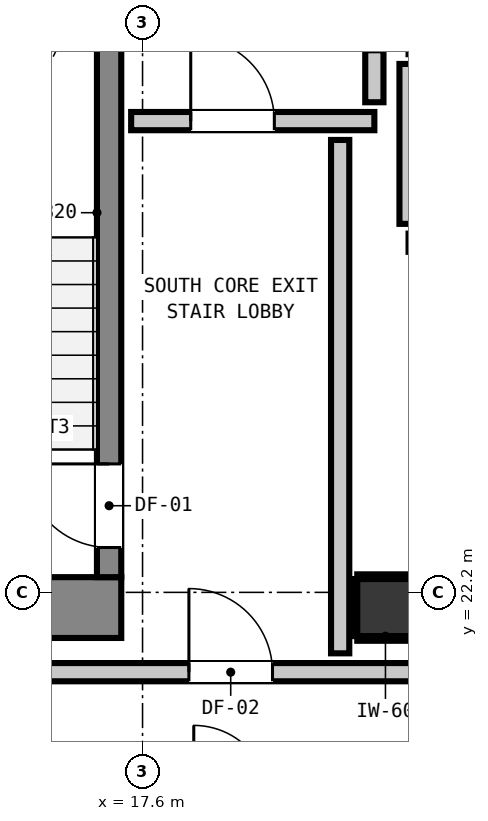
"""IFC4 building model, lengths in metres.
Left out: names, types, materials, properties, quantities, classifications, styles, units other than length and angle.
Written with IfcOpenShell. Run it as: python <this file> out.ifc"""

import sys

from ifc_helpers import new_model, si_unit, direction, frame, frame_2d, origin, origin_2d, place, context, subcontext, project, spatial, rectangle, extrude, element, fill, save


model = new_model("IFC4")
c1 = context("Model", 3, precision=1e-05, world=origin(), true_north=direction((0.0, 1.0)))
c2 = subcontext(c1, "Body", "Model", "MODEL_VIEW")
j1 = project(units=[si_unit("LENGTHUNIT", "METRE"), si_unit("PLANEANGLEUNIT", "RADIAN")], contexts=[c1])
p1 = place(None, origin())
s1 = spatial("IfcSite", under=j1, at=p1, CompositionType="ELEMENT")
p2 = place(p1, origin())
s2 = spatial("IfcBuilding", under=s1, at=p2, CompositionType="ELEMENT")
p3 = place(p2, frame((0.0, 0.0, 223.36)))
s3 = spatial("IfcBuildingStorey", under=s2, at=p3, CompositionType="ELEMENT", Elevation=223.36)
p4 = place(p3, frame((20.8, 22.0, 0.0), z_axis=(0.0, 0.0, 1.0), x_axis=(1.0, 0.0, 0.0)))
e1 = element("IfcColumn", 1, at=p4, inside=s3, PredefinedType="COLUMN", context=c2, shape_type="SweptSolid", body=[
    extrude(rectangle(XDim=0.75, YDim=0.75, at=origin_2d()), origin(), (0.0, 0.0, 1.0), 3.32),
])
p5 = place(p3, frame((13.24, 22.0, 0.0), z_axis=(0.0, 0.0, 1.0), x_axis=(1.0, 0.0, 0.0)))
e2 = element("IfcWall", 2, at=p5, inside=s3, PredefinedType="SHEAR", context=c2, shape_type="SweptSolid", body=[
    extrude(rectangle(XDim=4.08, YDim=0.8, at=frame_2d((2.04, 0.0))), origin(), (0.0, 0.0, 1.0), 3.32),
])
p6 = place(p3, frame((17.16, 22.4, 0.0), z_axis=(0.0, 0.0, 1.0), x_axis=(0.0, 1.0, 0.0)))
e3 = element("IfcWall", 3, at=p6, inside=s3, PredefinedType="SHEAR", context=c2, shape_type="SweptSolid", body=[
    extrude(rectangle(XDim=8.0, YDim=0.32, at=frame_2d((4.0, 0.0))), origin(), (0.0, 0.0, 1.0), 3.32),
])
p7 = place(p6, frame((0.39, 0.0, 0.0)))
e4 = element("IfcOpeningElement", 4, at=p7, cuts=e3, PredefinedType="OPENING", context=c2, shape_type="SweptSolid", body=[
    extrude(rectangle(XDim=1.1, YDim=2.15, at=frame_2d((0.55, 1.075))), frame((0.0, 0.17, 0.0), z_axis=(0.0, -1.0, 0.0), x_axis=(1.0, 0.0, 0.0)), (0.0, 0.0, 1.0), 0.34),
])
for number, where, z_axis, x_axis in (
    (5, (21.1, 26.8, 0.0), (0.0, 0.0, 1.0), (1.0, 0.0, 0.0)),
    (6, (21.1, 29.4, 0.0), (0.0, 0.0, 1.0), (1.0, 0.0, 0.0)),
):
    element("IfcWall", number, at=place(p3, frame(where, z_axis=z_axis, x_axis=x_axis)), inside=s3, PredefinedType="PARTITIONING", context=c2, shape_type="SweptSolid", body=[
        extrude(rectangle(XDim=2.2, YDim=0.24, at=frame_2d((1.1, 0.0))), origin(), (0.0, 0.0, 1.0), 2.92),
    ])
p8 = place(p3, frame((21.1, 27.048, 0.0), z_axis=(0.0, 0.0, 1.0), x_axis=(0.0, 1.0, 0.0)))
e7 = element("IfcWall", 7, at=p8, inside=s3, PredefinedType="PARTITIONING", context=c2, shape_type="SweptSolid", body=[
    extrude(rectangle(XDim=2.104, YDim=0.24, at=frame_2d((1.052, 0.0))), origin(), (0.0, 0.0, 1.0), 1.849),
])
p9 = place(p3, frame((10.787, 21.15, 0.0), z_axis=(0.0, 0.0, 1.0), x_axis=(1.0, 0.0, 0.0)))
e8 = element("IfcWall", 8, at=p9, inside=s3, PredefinedType="PARTITIONING", context=c2, shape_type="SweptSolid", body=[
    extrude(rectangle(XDim=36.626, YDim=0.24, at=frame_2d((18.313, 0.0))), origin(), (0.0, 0.0, 1.0), 2.92),
])
p10 = place(p9, frame((7.423, 0.0, 0.0)))
e9 = element("IfcOpeningElement", 9, at=p10, cuts=e8, PredefinedType="OPENING", context=c2, shape_type="SweptSolid", body=[
    extrude(rectangle(XDim=1.1, YDim=2.15, at=frame_2d((0.55, 1.075))), frame((0.0, 0.13, 0.0), z_axis=(0.0, -1.0, 0.0), x_axis=(1.0, 0.0, 0.0)), (0.0, 0.0, 1.0), 0.26),
])
p11 = place(p9, frame((29.788, 0.0, 0.0)))
e10 = element("IfcOpeningElement", 10, at=p11, cuts=e8, PredefinedType="OPENING", context=c2, shape_type="SweptSolid", body=[
    extrude(rectangle(XDim=1.0, YDim=2.15, at=frame_2d((0.5, 1.075))), frame((0.0, 0.13, 0.0), z_axis=(0.0, -1.0, 0.0), x_axis=(1.0, 0.0, 0.0)), (0.0, 0.0, 1.0), 0.26),
])
p12 = place(p3, frame((17.45, 28.4, 0.0), z_axis=(0.0, 0.0, 1.0), x_axis=(1.0, 0.0, 0.0)))
e11 = element("IfcWall", 11, at=p12, inside=s3, PredefinedType="PARTITIONING", context=c2, shape_type="SweptSolid", body=[
    extrude(rectangle(XDim=3.2, YDim=0.24, at=frame_2d((1.6, 0.0))), origin(), (0.0, 0.0, 1.0), 2.92),
])
p13 = place(p12, frame((0.784, 0.0, 0.0)))
e12 = element("IfcOpeningElement", 12, at=p13, cuts=e11, PredefinedType="OPENING", context=c2, shape_type="SweptSolid", body=[
    extrude(rectangle(XDim=1.1, YDim=2.15, at=frame_2d((0.55, 1.075))), frame((0.0, 0.13, 0.0), z_axis=(0.0, -1.0, 0.0), x_axis=(1.0, 0.0, 0.0)), (0.0, 0.0, 1.0), 0.26),
])
p14 = place(p3, frame((20.2, 21.398, 0.0), z_axis=(0.0, 0.0, 1.0), x_axis=(0.0, 1.0, 0.0)))
e13 = element("IfcWall", 13, at=p14, inside=s3, PredefinedType="PARTITIONING", context=c2, shape_type="SweptSolid", body=[
    extrude(rectangle(XDim=6.754, YDim=0.24, at=frame_2d((3.377, 0.0))), origin(), (0.0, 0.0, 1.0), 2.92),
])
p15 = place(p3, frame((20.65, 28.648, 0.0), z_axis=(0.0, 0.0, 1.0), x_axis=(0.0, 1.0, 0.0)))
e14 = element("IfcWall", 14, at=p15, inside=s3, PredefinedType="PARTITIONING", context=c2, shape_type="SweptSolid", body=[
    extrude(rectangle(XDim=0.684, YDim=0.24, at=frame_2d((0.342, 0.0))), origin(), (0.0, 0.0, 1.0), 1.849),
])
for number, where, z_axis, x_axis in (
    (15, (20.425, 21.593, 0.0), (0.0, 0.0, 1.0), (1.0, 0.0, 0.0)),
    (16, (20.425, 22.407, 0.0), (0.0, 0.0, 1.0), (1.0, 0.0, 0.0)),
):
    element("IfcWall", number, at=place(p3, frame(where, z_axis=z_axis, x_axis=x_axis)), inside=s3, PredefinedType="PARTITIONING", context=c2, shape_type="SweptSolid", body=[
        extrude(rectangle(XDim=0.742, YDim=0.06, at=frame_2d((0.371, 0.0))), origin(), (0.0, 0.0, 1.0), 1.45),
    ])
p16 = place(p3, frame((20.393, 21.625, 0.0), z_axis=(0.0, 0.0, 1.0), x_axis=(0.0, 1.0, 0.0)))
e17 = element("IfcWall", 17, at=p16, inside=s3, PredefinedType="PARTITIONING", context=c2, shape_type="SweptSolid", body=[
    extrude(rectangle(XDim=0.75, YDim=0.06, at=frame_2d((0.375, 0.0))), origin(), (0.0, 0.0, 1.0), 1.45),
])
p17 = place(p7, origin())
e18 = element("IfcDoor", 18, at=p17, inside=s3, OperationType="SINGLE_SWING_RIGHT", PredefinedType="DOOR", context=c2, shape_type="SweptSolid", body=[
    extrude(rectangle(XDim=1.1, YDim=2.15, at=frame_2d((0.55, 1.075))), frame((0.0, 0.025, 0.0), z_axis=(0.0, -1.0, 0.0), x_axis=(1.0, 0.0, 0.0)), (0.0, 0.0, 1.0), 0.05),
])
fill(e4, e18)
p18 = place(p13, origin())
e19 = element("IfcDoor", 19, at=p18, inside=s3, OperationType="SINGLE_SWING_LEFT", PredefinedType="DOOR", context=c2, shape_type="SweptSolid", body=[
    extrude(rectangle(XDim=1.1, YDim=2.15, at=frame_2d((0.55, 1.075))), frame((0.0, 0.025, 0.0), z_axis=(0.0, -1.0, 0.0), x_axis=(1.0, 0.0, 0.0)), (0.0, 0.0, 1.0), 0.05),
])
fill(e12, e19)
p19 = place(p10, origin())
e20 = element("IfcDoor", 20, at=p19, inside=s3, OperationType="SINGLE_SWING_LEFT", PredefinedType="DOOR", context=c2, shape_type="SweptSolid", body=[
    extrude(rectangle(XDim=1.1, YDim=2.15, at=frame_2d((0.55, 1.075))), frame((0.0, 0.025, 0.0), z_axis=(0.0, -1.0, 0.0), x_axis=(1.0, 0.0, 0.0)), (0.0, 0.0, 1.0), 0.05),
])
fill(e9, e20)
save(model, sys.argv[1])
